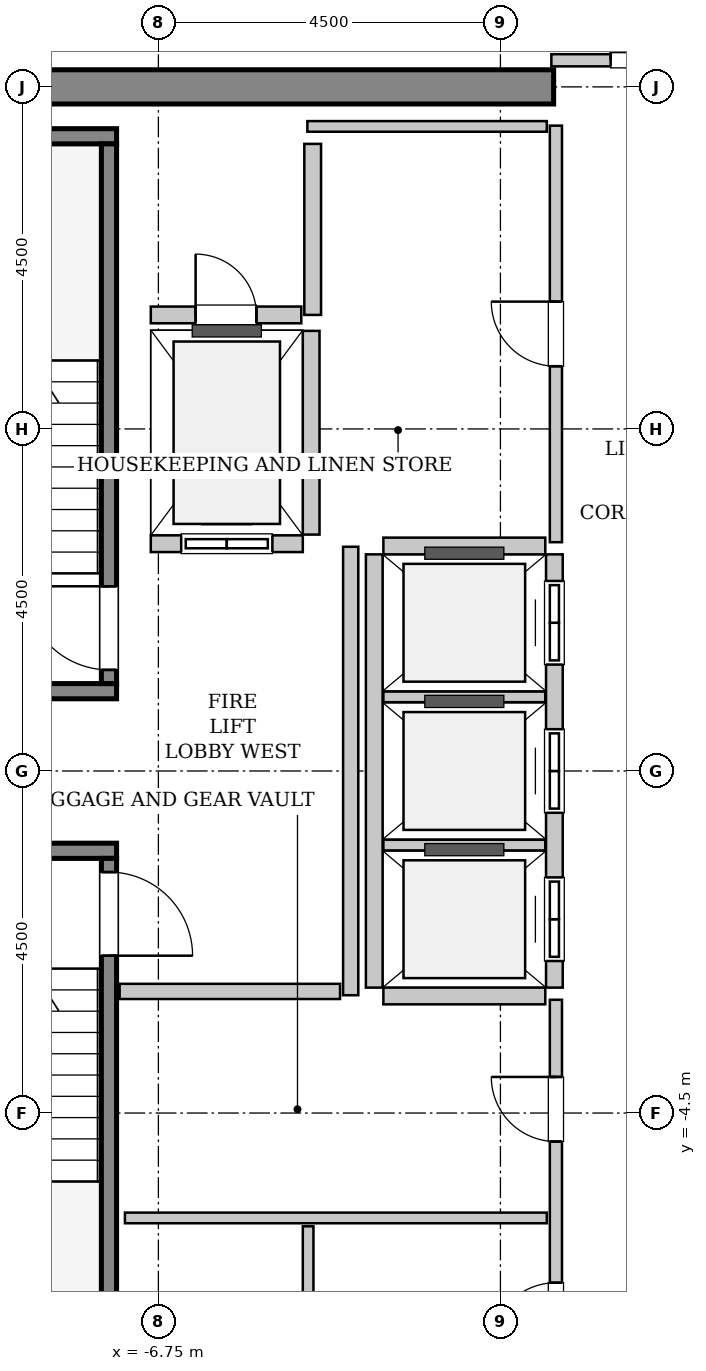
"""IFC4 building model, lengths in metres.
Left out: names, types, materials, properties, quantities, classifications, styles, units other than length and angle.
Written with IfcOpenShell. Run it as: python <this file> out.ifc"""

import sys

from ifc_helpers import new_model, si_unit, direction, frame, frame_2d, origin, place, context, subcontext, project, spatial, rectangle, extrude, source, transform, mapped, element, fill, save


model = new_model("IFC4")
c1 = context("Model", 3, precision=1e-05, world=origin(), true_north=direction((0.0, 1.0)))
c2 = subcontext(c1, "Body", "Model", "MODEL_VIEW")
j1 = project(units=[si_unit("LENGTHUNIT", "METRE"), si_unit("PLANEANGLEUNIT", "RADIAN")], contexts=[c1])
p1 = place(None, origin())
s1 = spatial("IfcSite", under=j1, at=p1, CompositionType="ELEMENT")
p2 = place(p1, origin())
s2 = spatial("IfcBuilding", under=s1, at=p2, CompositionType="ELEMENT")
p3 = place(p2, frame((0.0, 0.0, 287.4)))
s3 = spatial("IfcBuildingStorey", under=s2, at=p3, CompositionType="ELEMENT", Elevation=287.4)
m1 = source(origin(), c2, "Body", "SweptSolid", [
    extrude(rectangle(XDim=9.925, YDim=0.45, at=frame_2d((4.962, 0.0))), origin(), (0.0, 0.0, 1.0), 3.8),
])
p4 = place(p3, frame((-11.475, 9.0, 0.0), z_axis=(0.0, 0.0, 1.0), x_axis=(1.0, 0.0, 0.0)))
e1 = element("IfcWall", 1, at=p4, inside=s3, PredefinedType="SHEAR", context=c2, shape_type="MappedRepresentation", body=[
    mapped(m1, transform((0.0, 0.0, 0.0), x_axis=(1.0, 0.0, 0.0), y_axis=(0.0, 1.0, 0.0), z_axis=(0.0, 0.0, 1.0), scale=1.0)),
])
m2 = source(origin(), c2, "Body", "SweptSolid", [
    extrude(rectangle(XDim=3.4, YDim=0.2, at=frame_2d((1.7, 0.0))), origin(), (0.0, 0.0, 1.0), 3.8),
])
p5 = place(p3, frame((-7.3, 1.05, 0.0), z_axis=(0.0, 0.0, 1.0), x_axis=(-1.0, 0.0, 0.0)))
e2 = element("IfcWall", 2, at=p5, inside=s3, PredefinedType="SOLIDWALL", context=c2, shape_type="MappedRepresentation", body=[
    mapped(m2, transform((0.0, 0.0, 0.0), x_axis=(1.0, 0.0, 0.0), y_axis=(0.0, 1.0, 0.0), z_axis=(0.0, 0.0, 1.0), scale=1.0)),
])
m3 = source(origin(), c2, "Body", "SweptSolid", [
    extrude(rectangle(XDim=3.73, YDim=0.2, at=frame_2d((1.865, 0.0))), origin(), (0.0, 0.0, 1.0), 3.8),
])
p6 = place(p3, frame((-7.3, 8.35, 0.0), z_axis=(0.0, 0.0, 1.0), x_axis=(-1.0, 0.0, 0.0)))
e3 = element("IfcWall", 3, at=p6, inside=s3, PredefinedType="SOLIDWALL", context=c2, shape_type="MappedRepresentation", body=[
    mapped(m3, transform((0.0, 0.0, 0.0), x_axis=(1.0, 0.0, 0.0), y_axis=(0.0, 1.0, 0.0), z_axis=(0.0, 0.0, 1.0), scale=1.0)),
])
m4 = source(origin(), c2, "Body", "SweptSolid", [
    extrude(rectangle(XDim=7.1, YDim=0.2, at=frame_2d((3.55, 0.0))), origin(), (0.0, 0.0, 1.0), 3.8),
])
p7 = place(p3, frame((-7.4, 1.15, 0.0), z_axis=(0.0, 0.0, 1.0), x_axis=(0.0, 1.0, 0.0)))
e4 = element("IfcWall", 4, at=p7, inside=s3, PredefinedType="SOLIDWALL", context=c2, shape_type="MappedRepresentation", body=[
    mapped(m4, transform((0.0, 0.0, 0.0), x_axis=(1.0, 0.0, 0.0), y_axis=(0.0, 1.0, 0.0), z_axis=(0.0, 0.0, 1.0), scale=1.0)),
])
p8 = place(p7, frame((0.18, 0.0, 0.0)))
e5 = element("IfcOpeningElement", 5, at=p8, cuts=e4, PredefinedType="OPENING", context=c2, shape_type="SweptSolid", body=[
    extrude(rectangle(XDim=1.1, YDim=2.15, at=frame_2d((0.55, 1.075))), frame((0.0, 0.11, 0.0), z_axis=(0.0, -1.0, 0.0), x_axis=(1.0, 0.0, 0.0)), (0.0, 0.0, 1.0), 0.22),
])
p9 = place(p3, frame((-10.7, -1.05, 0.0), z_axis=(0.0, 0.0, 1.0), x_axis=(1.0, 0.0, 0.0)))
e6 = element("IfcWall", 6, at=p9, inside=s3, PredefinedType="SOLIDWALL", context=c2, shape_type="MappedRepresentation", body=[
    mapped(m2, transform((0.0, 0.0, 0.0), x_axis=(1.0, 0.0, 0.0), y_axis=(0.0, 1.0, 0.0), z_axis=(0.0, 0.0, 1.0), scale=1.0)),
])
p10 = place(p3, frame((-7.4, -1.15, 0.0), z_axis=(0.0, 0.0, 1.0), x_axis=(0.0, -1.0, 0.0)))
e7 = element("IfcWall", 7, at=p10, inside=s3, PredefinedType="SOLIDWALL", context=c2, shape_type="MappedRepresentation", body=[
    mapped(m4, transform((0.0, 0.0, 0.0), x_axis=(1.0, 0.0, 0.0), y_axis=(0.0, 1.0, 0.0), z_axis=(0.0, 0.0, 1.0), scale=1.0)),
])
p11 = place(p10, frame((0.18, 0.0, 0.0)))
e8 = element("IfcOpeningElement", 8, at=p11, cuts=e7, PredefinedType="OPENING", context=c2, shape_type="SweptSolid", body=[
    extrude(rectangle(XDim=1.1, YDim=2.15, at=frame_2d((0.55, 1.075))), frame((0.0, 0.11, 0.0), z_axis=(0.0, -1.0, 0.0), x_axis=(1.0, 0.0, 0.0)), (0.0, 0.0, 1.0), 0.22),
])
m5 = source(origin(), c2, "Body", "SweptSolid", [
    extrude(rectangle(XDim=2.0, YDim=0.22, at=frame_2d((1.0, 0.0))), origin(), (0.0, 0.0, 1.0), 3.535),
])
p12 = place(p3, frame((-6.85, 2.99, 0.0), z_axis=(0.0, 0.0, 1.0), x_axis=(1.0, 0.0, 0.0)))
e9 = element("IfcWall", 9, at=p12, inside=s3, PredefinedType="SOLIDWALL", context=c2, shape_type="MappedRepresentation", body=[
    mapped(m5, transform((0.0, 0.0, 0.0), x_axis=(1.0, 0.0, 0.0), y_axis=(0.0, 1.0, 0.0), z_axis=(0.0, 0.0, 1.0), scale=1.0)),
])
p13 = place(p12, frame((0.4, 0.0, 0.0)))
e10 = element("IfcOpeningElement", 10, at=p13, cuts=e9, PredefinedType="OPENING", context=c2, shape_type="SweptSolid", body=[
    extrude(rectangle(XDim=1.2, YDim=2.2, at=frame_2d((0.6, 1.1))), frame((0.0, 0.12, 0.0), z_axis=(0.0, -1.0, 0.0), x_axis=(1.0, 0.0, 0.0)), (0.0, 0.0, 1.0), 0.24),
])
m6 = source(origin(), c2, "Body", "SweptSolid", [
    extrude(rectangle(XDim=2.68, YDim=0.22, at=frame_2d((1.34, 0.0))), origin(), (0.0, 0.0, 1.0), 3.535),
])
p14 = place(p3, frame((-4.74, 3.11, 0.0), z_axis=(0.0, 0.0, 1.0), x_axis=(0.0, 1.0, 0.0)))
e11 = element("IfcWall", 11, at=p14, inside=s3, PredefinedType="SOLIDWALL", context=c2, shape_type="MappedRepresentation", body=[
    mapped(m6, transform((0.0, 0.0, 0.0), x_axis=(1.0, 0.0, 0.0), y_axis=(0.0, 1.0, 0.0), z_axis=(0.0, 0.0, 1.0), scale=1.0)),
])
m7 = source(origin(), c2, "Body", "SweptSolid", [
    extrude(rectangle(XDim=5.7, YDim=0.22, at=frame_2d((2.85, 0.0))), origin(), (0.0, 0.0, 1.0), 3.535),
])
p15 = place(p3, frame((-1.54, -2.85, 0.0), z_axis=(0.0, 0.0, 1.0), x_axis=(0.0, 1.0, 0.0)))
e12 = element("IfcWall", 12, at=p15, inside=s3, PredefinedType="SOLIDWALL", context=c2, shape_type="MappedRepresentation", body=[
    mapped(m7, transform((0.0, 0.0, 0.0), x_axis=(1.0, 0.0, 0.0), y_axis=(0.0, 1.0, 0.0), z_axis=(0.0, 0.0, 1.0), scale=1.0)),
])
p16 = place(p15, frame((0.35, 0.0, 0.0)))
e13 = element("IfcOpeningElement", 13, at=p16, cuts=e12, PredefinedType="OPENING", context=c2, shape_type="SweptSolid", body=[
    extrude(rectangle(XDim=1.1, YDim=2.2, at=frame_2d((0.55, 1.1))), frame((0.0, 0.12, 0.0), z_axis=(0.0, -1.0, 0.0), x_axis=(1.0, 0.0, 0.0)), (0.0, 0.0, 1.0), 0.24),
])
p17 = place(p15, frame((2.3, 0.0, 0.0)))
e14 = element("IfcOpeningElement", 14, at=p17, cuts=e12, PredefinedType="OPENING", context=c2, shape_type="SweptSolid", body=[
    extrude(rectangle(XDim=1.1, YDim=2.2, at=frame_2d((0.55, 1.1))), frame((0.0, 0.12, 0.0), z_axis=(0.0, -1.0, 0.0), x_axis=(1.0, 0.0, 0.0)), (0.0, 0.0, 1.0), 0.24),
])
p18 = place(p15, frame((4.25, 0.0, 0.0)))
e15 = element("IfcOpeningElement", 15, at=p18, cuts=e12, PredefinedType="OPENING", context=c2, shape_type="SweptSolid", body=[
    extrude(rectangle(XDim=1.1, YDim=2.2, at=frame_2d((0.55, 1.1))), frame((0.0, 0.12, 0.0), z_axis=(0.0, -1.0, 0.0), x_axis=(1.0, 0.0, 0.0)), (0.0, 0.0, 1.0), 0.24),
])
p19 = place(p3, frame((-3.91, 2.85, 0.0), z_axis=(0.0, 0.0, 1.0), x_axis=(0.0, -1.0, 0.0)))
e16 = element("IfcWall", 16, at=p19, inside=s3, PredefinedType="SOLIDWALL", context=c2, shape_type="MappedRepresentation", body=[
    mapped(m7, transform((0.0, 0.0, 0.0), x_axis=(1.0, 0.0, 0.0), y_axis=(0.0, 1.0, 0.0), z_axis=(0.0, 0.0, 1.0), scale=1.0)),
])
m8 = source(origin(), c2, "Body", "SweptSolid", [
    extrude(rectangle(XDim=2.13, YDim=0.22, at=frame_2d((1.065, 0.0))), origin(), (0.0, 0.0, 1.0), 3.535),
])
p20 = place(p3, frame((-3.79, -2.96, 0.0), z_axis=(0.0, 0.0, 1.0), x_axis=(1.0, 0.0, 0.0)))
e17 = element("IfcWall", 17, at=p20, inside=s3, PredefinedType="SOLIDWALL", context=c2, shape_type="MappedRepresentation", body=[
    mapped(m8, transform((0.0, 0.0, 0.0), x_axis=(1.0, 0.0, 0.0), y_axis=(0.0, 1.0, 0.0), z_axis=(0.0, 0.0, 1.0), scale=1.0)),
])
m9 = source(origin(), c2, "Body", "SweptSolid", [
    extrude(rectangle(XDim=2.13, YDim=0.14, at=frame_2d((1.065, 0.0))), origin(), (0.0, 0.0, 1.0), 3.535),
])
for number, where, z_axis, x_axis in (
    (18, (-3.79, -0.975, 0.0), (0.0, 0.0, 1.0), (1.0, 0.0, 0.0)),
    (19, (-3.79, 0.975, 0.0), (0.0, 0.0, 1.0), (1.0, 0.0, 0.0)),
):
    element("IfcWall", number, at=place(p3, frame(where, z_axis=z_axis, x_axis=x_axis)), inside=s3, PredefinedType="PARTITIONING", context=c2, shape_type="MappedRepresentation", body=[
        mapped(m9, transform((0.0, 0.0, 0.0), x_axis=(1.0, 0.0, 0.0), y_axis=(0.0, 1.0, 0.0), z_axis=(0.0, 0.0, 1.0), scale=1.0)),
    ])
p21 = place(p3, frame((-1.66, 2.96, 0.0), z_axis=(0.0, 0.0, 1.0), x_axis=(-1.0, 0.0, 0.0)))
e20 = element("IfcWall", 20, at=p21, inside=s3, PredefinedType="SOLIDWALL", context=c2, shape_type="MappedRepresentation", body=[
    mapped(m8, transform((0.0, 0.0, 0.0), x_axis=(1.0, 0.0, 0.0), y_axis=(0.0, 1.0, 0.0), z_axis=(0.0, 0.0, 1.0), scale=1.0)),
])
m10 = source(origin(), c2, "Body", "SweptSolid", [
    extrude(rectangle(XDim=2.25, YDim=0.22, at=frame_2d((1.125, 0.0))), origin(), (0.0, 0.0, 1.0), 3.535),
])
p22 = place(p3, frame((-4.72, 6.0, 0.0), z_axis=(0.0, 0.0, 1.0), x_axis=(0.0, 1.0, 0.0)))
e21 = element("IfcWall", 21, at=p22, inside=s3, PredefinedType="SOLIDWALL", context=c2, shape_type="MappedRepresentation", body=[
    mapped(m10, transform((0.0, 0.0, 0.0), x_axis=(1.0, 0.0, 0.0), y_axis=(0.0, 1.0, 0.0), z_axis=(0.0, 0.0, 1.0), scale=1.0)),
])
m11 = source(origin(), c2, "Body", "SweptSolid", [
    extrude(rectangle(XDim=1.98, YDim=0.22, at=frame_2d((0.99, 0.0))), origin(), (0.0, 0.0, 1.0), 3.535),
])
p23 = place(p3, frame((-6.85, 6.0, 0.0), z_axis=(0.0, 0.0, 1.0), x_axis=(1.0, 0.0, 0.0)))
e22 = element("IfcWall", 22, at=p23, inside=s3, PredefinedType="SOLIDWALL", context=c2, shape_type="MappedRepresentation", body=[
    mapped(m11, transform((0.0, 0.0, 0.0), x_axis=(1.0, 0.0, 0.0), y_axis=(0.0, 1.0, 0.0), z_axis=(0.0, 0.0, 1.0), scale=1.0)),
])
p24 = place(p23, frame((0.59, 0.0, 0.0)))
e23 = element("IfcOpeningElement", 23, at=p24, cuts=e22, PredefinedType="OPENING", context=c2, shape_type="SweptSolid", body=[
    extrude(rectangle(XDim=0.8, YDim=2.0, at=frame_2d((0.4, 1.0))), frame((0.0, 0.12, 0.0), z_axis=(0.0, -1.0, 0.0), x_axis=(1.0, 0.0, 0.0)), (0.0, 0.0, 1.0), 0.24),
])
m12 = source(origin(), c2, "Body", "SweptSolid", [
    extrude(rectangle(XDim=5.9, YDim=0.2, at=frame_2d((2.95, 0.0))), origin(), (0.0, 0.0, 1.0), 3.535),
])
p25 = place(p3, frame((-4.22, -2.95, 0.0), z_axis=(0.0, 0.0, 1.0), x_axis=(0.0, 1.0, 0.0)))
e24 = element("IfcWall", 24, at=p25, inside=s3, PredefinedType="PARTITIONING", context=c2, shape_type="MappedRepresentation", body=[
    mapped(m12, transform((0.0, 0.0, 0.0), x_axis=(1.0, 0.0, 0.0), y_axis=(0.0, 1.0, 0.0), z_axis=(0.0, 0.0, 1.0), scale=1.0)),
])
m13 = source(origin(), c2, "Body", "SweptSolid", [
    extrude(rectangle(XDim=2.9, YDim=0.2, at=frame_2d((1.45, 0.0))), origin(), (0.0, 0.0, 1.0), 3.535),
])
p26 = place(p3, frame((-7.26, -2.9, 0.0), z_axis=(0.0, 0.0, 1.0), x_axis=(1.0, 0.0, 0.0)))
e25 = element("IfcWall", 25, at=p26, inside=s3, PredefinedType="PARTITIONING", context=c2, shape_type="MappedRepresentation", body=[
    mapped(m13, transform((0.0, 0.0, 0.0), x_axis=(1.0, 0.0, 0.0), y_axis=(0.0, 1.0, 0.0), z_axis=(0.0, 0.0, 1.0), scale=1.0)),
])
m14 = source(origin(), c2, "Body", "SweptSolid", [
    extrude(rectangle(XDim=3.16, YDim=0.16, at=frame_2d((1.58, 0.0))), origin(), (0.0, 0.0, 1.0), 2.625),
])
p27 = place(p3, frame((-1.58, 9.35, 0.0), z_axis=(0.0, 0.0, 1.0), x_axis=(1.0, 0.0, 0.0)))
e26 = element("IfcWall", 26, at=p27, inside=s3, PredefinedType="PARTITIONING", context=c2, shape_type="MappedRepresentation", body=[
    mapped(m14, transform((0.0, 0.0, 0.0), x_axis=(1.0, 0.0, 0.0), y_axis=(0.0, 1.0, 0.0), z_axis=(0.0, 0.0, 1.0), scale=1.0)),
])
p28 = place(p27, frame((0.78, 0.0, 0.0)))
e27 = element("IfcOpeningElement", 27, at=p28, cuts=e26, PredefinedType="OPENING", context=c2, shape_type="SweptSolid", body=[
    extrude(rectangle(XDim=1.6, YDim=2.3, at=frame_2d((0.8, 1.15))), frame((0.0, 0.09, 0.0), z_axis=(0.0, -1.0, 0.0), x_axis=(1.0, 0.0, 0.0)), (0.0, 0.0, 1.0), 0.18),
])
m15 = source(origin(), c2, "Body", "SweptSolid", [
    extrude(rectangle(XDim=5.48, YDim=0.16, at=frame_2d((2.74, 0.0))), origin(), (0.0, 0.0, 1.0), 3.535),
])
p29 = place(p3, frame((-1.52, 3.01, 0.0), z_axis=(0.0, 0.0, 1.0), x_axis=(0.0, 1.0, 0.0)))
e28 = element("IfcWall", 28, at=p29, inside=s3, PredefinedType="PARTITIONING", context=c2, shape_type="MappedRepresentation", body=[
    mapped(m15, transform((0.0, 0.0, 0.0), x_axis=(1.0, 0.0, 0.0), y_axis=(0.0, 1.0, 0.0), z_axis=(0.0, 0.0, 1.0), scale=1.0)),
])
p30 = place(p29, frame((2.315, 0.0, 0.0)))
e29 = element("IfcOpeningElement", 29, at=p30, cuts=e28, PredefinedType="OPENING", context=c2, shape_type="SweptSolid", body=[
    extrude(rectangle(XDim=0.85, YDim=2.1, at=frame_2d((0.425, 1.05))), frame((0.0, 0.09, 0.0), z_axis=(0.0, -1.0, 0.0), x_axis=(1.0, 0.0, 0.0)), (0.0, 0.0, 1.0), 0.18),
])
m16 = source(origin(), c2, "Body", "SweptSolid", [
    extrude(rectangle(XDim=3.15, YDim=0.14, at=frame_2d((1.575, 0.0))), origin(), (0.0, 0.0, 1.0), 3.535),
])
p31 = place(p3, frame((-4.79, 8.48, 0.0), z_axis=(0.0, 0.0, 1.0), x_axis=(1.0, 0.0, 0.0)))
e30 = element("IfcWall", 30, at=p31, inside=s3, PredefinedType="PARTITIONING", context=c2, shape_type="MappedRepresentation", body=[
    mapped(m16, transform((0.0, 0.0, 0.0), x_axis=(1.0, 0.0, 0.0), y_axis=(0.0, 1.0, 0.0), z_axis=(0.0, 0.0, 1.0), scale=1.0)),
])
p32 = place(p3, frame((-1.52, -8.49, 0.0), z_axis=(0.0, 0.0, 1.0), x_axis=(0.0, 1.0, 0.0)))
e31 = element("IfcWall", 31, at=p32, inside=s3, PredefinedType="PARTITIONING", context=c2, shape_type="MappedRepresentation", body=[
    mapped(m15, transform((0.0, 0.0, 0.0), x_axis=(1.0, 0.0, 0.0), y_axis=(0.0, 1.0, 0.0), z_axis=(0.0, 0.0, 1.0), scale=1.0)),
])
p33 = place(p32, frame((0.907, 0.0, 0.0)))
e32 = element("IfcOpeningElement", 32, at=p33, cuts=e31, PredefinedType="OPENING", context=c2, shape_type="SweptSolid", body=[
    extrude(rectangle(XDim=0.85, YDim=2.1, at=frame_2d((0.425, 1.05))), frame((0.0, 0.09, 0.0), z_axis=(0.0, -1.0, 0.0), x_axis=(1.0, 0.0, 0.0)), (0.0, 0.0, 1.0), 0.18),
])
p34 = place(p32, frame((3.615, 0.0, 0.0)))
e33 = element("IfcOpeningElement", 33, at=p34, cuts=e31, PredefinedType="OPENING", context=c2, shape_type="SweptSolid", body=[
    extrude(rectangle(XDim=0.85, YDim=2.1, at=frame_2d((0.425, 1.05))), frame((0.0, 0.09, 0.0), z_axis=(0.0, -1.0, 0.0), x_axis=(1.0, 0.0, 0.0)), (0.0, 0.0, 1.0), 0.18),
])
m17 = source(origin(), c2, "Body", "SweptSolid", [
    extrude(rectangle(XDim=5.55, YDim=0.14, at=frame_2d((2.775, 0.0))), origin(), (0.0, 0.0, 1.0), 3.535),
])
p35 = place(p3, frame((-7.19, -5.88, 0.0), z_axis=(0.0, 0.0, 1.0), x_axis=(1.0, 0.0, 0.0)))
e34 = element("IfcWall", 34, at=p35, inside=s3, PredefinedType="PARTITIONING", context=c2, shape_type="MappedRepresentation", body=[
    mapped(m17, transform((0.0, 0.0, 0.0), x_axis=(1.0, 0.0, 0.0), y_axis=(0.0, 1.0, 0.0), z_axis=(0.0, 0.0, 1.0), scale=1.0)),
])
m18 = source(origin(), c2, "Body", "SweptSolid", [
    extrude(rectangle(XDim=2.38, YDim=0.14, at=frame_2d((1.19, 0.0))), origin(), (0.0, 0.0, 1.0), 3.535),
])
p36 = place(p3, frame((-4.78, -8.37, 0.0), z_axis=(0.0, 0.0, 1.0), x_axis=(0.0, 1.0, 0.0)))
e35 = element("IfcWall", 35, at=p36, inside=s3, PredefinedType="PARTITIONING", context=c2, shape_type="MappedRepresentation", body=[
    mapped(m18, transform((0.0, 0.0, 0.0), x_axis=(1.0, 0.0, 0.0), y_axis=(0.0, 1.0, 0.0), z_axis=(0.0, 0.0, 1.0), scale=1.0)),
])
m19 = source(origin(), c2, "Body", "SweptSolid", [
    extrude(rectangle(XDim=1.1, YDim=2.15, at=frame_2d((0.55, 1.075))), frame((0.0, 0.025, 0.0), z_axis=(0.0, -1.0, 0.0), x_axis=(1.0, 0.0, 0.0)), (0.0, 0.0, 1.0), 0.05),
])
p37 = place(p8, origin())
e36 = element("IfcDoor", 36, at=p37, inside=s3, OperationType="SINGLE_SWING_RIGHT", PredefinedType="DOOR", context=c2, shape_type="MappedRepresentation", body=[
    mapped(m19, transform((0.0, 0.0, 0.0), x_axis=(1.0, 0.0, 0.0), y_axis=(0.0, 1.0, 0.0), z_axis=(0.0, 0.0, 1.0), scale=1.0)),
])
fill(e5, e36)
p38 = place(p11, origin())
e37 = element("IfcDoor", 37, at=p38, inside=s3, OperationType="SINGLE_SWING_RIGHT", PredefinedType="DOOR", context=c2, shape_type="MappedRepresentation", body=[
    mapped(m19, transform((0.0, 0.0, 0.0), x_axis=(1.0, 0.0, 0.0), y_axis=(0.0, 1.0, 0.0), z_axis=(0.0, 0.0, 1.0), scale=1.0)),
])
fill(e8, e37)
m20 = source(origin(), c2, "Body", "SweptSolid", [
    extrude(rectangle(XDim=1.2, YDim=2.2, at=frame_2d((0.6, 1.1))), frame((0.0, 0.025, 0.0), z_axis=(0.0, -1.0, 0.0), x_axis=(1.0, 0.0, 0.0)), (0.0, 0.0, 1.0), 0.05),
])
p39 = place(p13, origin())
e38 = element("IfcDoor", 38, at=p39, inside=s3, OperationType="SLIDING_TO_LEFT", PredefinedType="DOOR", context=c2, shape_type="MappedRepresentation", body=[
    mapped(m20, transform((0.0, 0.0, 0.0), x_axis=(1.0, 0.0, 0.0), y_axis=(0.0, 1.0, 0.0), z_axis=(0.0, 0.0, 1.0), scale=1.0)),
])
fill(e10, e38)
m21 = source(origin(), c2, "Body", "SweptSolid", [
    extrude(rectangle(XDim=1.1, YDim=2.2, at=frame_2d((0.55, 1.1))), frame((0.0, 0.025, 0.0), z_axis=(0.0, -1.0, 0.0), x_axis=(1.0, 0.0, 0.0)), (0.0, 0.0, 1.0), 0.05),
])
p40 = place(p16, origin())
e39 = element("IfcDoor", 39, at=p40, inside=s3, OperationType="DOUBLE_DOOR_SLIDING", PredefinedType="DOOR", context=c2, shape_type="MappedRepresentation", body=[
    mapped(m21, transform((0.0, 0.0, 0.0), x_axis=(1.0, 0.0, 0.0), y_axis=(0.0, 1.0, 0.0), z_axis=(0.0, 0.0, 1.0), scale=1.0)),
])
fill(e13, e39)
p41 = place(p17, origin())
e40 = element("IfcDoor", 40, at=p41, inside=s3, OperationType="DOUBLE_DOOR_SLIDING", PredefinedType="DOOR", context=c2, shape_type="MappedRepresentation", body=[
    mapped(m21, transform((0.0, 0.0, 0.0), x_axis=(1.0, 0.0, 0.0), y_axis=(0.0, 1.0, 0.0), z_axis=(0.0, 0.0, 1.0), scale=1.0)),
])
fill(e14, e40)
p42 = place(p18, origin())
e41 = element("IfcDoor", 41, at=p42, inside=s3, OperationType="DOUBLE_DOOR_SLIDING", PredefinedType="DOOR", context=c2, shape_type="MappedRepresentation", body=[
    mapped(m21, transform((0.0, 0.0, 0.0), x_axis=(1.0, 0.0, 0.0), y_axis=(0.0, 1.0, 0.0), z_axis=(0.0, 0.0, 1.0), scale=1.0)),
])
fill(e15, e41)
m22 = source(origin(), c2, "Body", "SweptSolid", [
    extrude(rectangle(XDim=0.8, YDim=2.0, at=frame_2d((0.4, 1.0))), frame((0.0, 0.025, 0.0), z_axis=(0.0, -1.0, 0.0), x_axis=(1.0, 0.0, 0.0)), (0.0, 0.0, 1.0), 0.05),
])
p43 = place(p24, origin())
e42 = element("IfcDoor", 42, at=p43, inside=s3, OperationType="SINGLE_SWING_LEFT", PredefinedType="TRAPDOOR", context=c2, shape_type="MappedRepresentation", body=[
    mapped(m22, transform((0.0, 0.0, 0.0), x_axis=(1.0, 0.0, 0.0), y_axis=(0.0, 1.0, 0.0), z_axis=(0.0, 0.0, 1.0), scale=1.0)),
])
fill(e23, e42)
m23 = source(origin(), c2, "Body", "SweptSolid", [
    extrude(rectangle(XDim=1.6, YDim=2.3, at=frame_2d((0.8, 1.15))), frame((0.0, 0.025, 0.0), z_axis=(0.0, -1.0, 0.0), x_axis=(1.0, 0.0, 0.0)), (0.0, 0.0, 1.0), 0.05),
])
p44 = place(p28, origin())
e43 = element("IfcDoor", 43, at=p44, inside=s3, OperationType="DOUBLE_DOOR_SINGLE_SWING", PredefinedType="DOOR", context=c2, shape_type="MappedRepresentation", body=[
    mapped(m23, transform((0.0, 0.0, 0.0), x_axis=(1.0, 0.0, 0.0), y_axis=(0.0, 1.0, 0.0), z_axis=(0.0, 0.0, 1.0), scale=1.0)),
])
fill(e27, e43)
m24 = source(origin(), c2, "Body", "SweptSolid", [
    extrude(rectangle(XDim=0.85, YDim=2.1, at=frame_2d((0.425, 1.05))), frame((0.0, 0.025, 0.0), z_axis=(0.0, -1.0, 0.0), x_axis=(1.0, 0.0, 0.0)), (0.0, 0.0, 1.0), 0.05),
])
p45 = place(p30, origin())
e44 = element("IfcDoor", 44, at=p45, inside=s3, OperationType="SINGLE_SWING_RIGHT", PredefinedType="DOOR", context=c2, shape_type="MappedRepresentation", body=[
    mapped(m24, transform((0.0, 0.0, 0.0), x_axis=(1.0, 0.0, 0.0), y_axis=(0.0, 1.0, 0.0), z_axis=(0.0, 0.0, 1.0), scale=1.0)),
])
fill(e29, e44)
p46 = place(p33, origin())
e45 = element("IfcDoor", 45, at=p46, inside=s3, OperationType="SINGLE_SWING_LEFT", PredefinedType="DOOR", context=c2, shape_type="MappedRepresentation", body=[
    mapped(m24, transform((0.0, 0.0, 0.0), x_axis=(1.0, 0.0, 0.0), y_axis=(0.0, 1.0, 0.0), z_axis=(0.0, 0.0, 1.0), scale=1.0)),
])
fill(e32, e45)
p47 = place(p34, origin())
e46 = element("IfcDoor", 46, at=p47, inside=s3, OperationType="SINGLE_SWING_RIGHT", PredefinedType="DOOR", context=c2, shape_type="MappedRepresentation", body=[
    mapped(m24, transform((0.0, 0.0, 0.0), x_axis=(1.0, 0.0, 0.0), y_axis=(0.0, 1.0, 0.0), z_axis=(0.0, 0.0, 1.0), scale=1.0)),
])
fill(e33, e46)
save(model, sys.argv[1])
